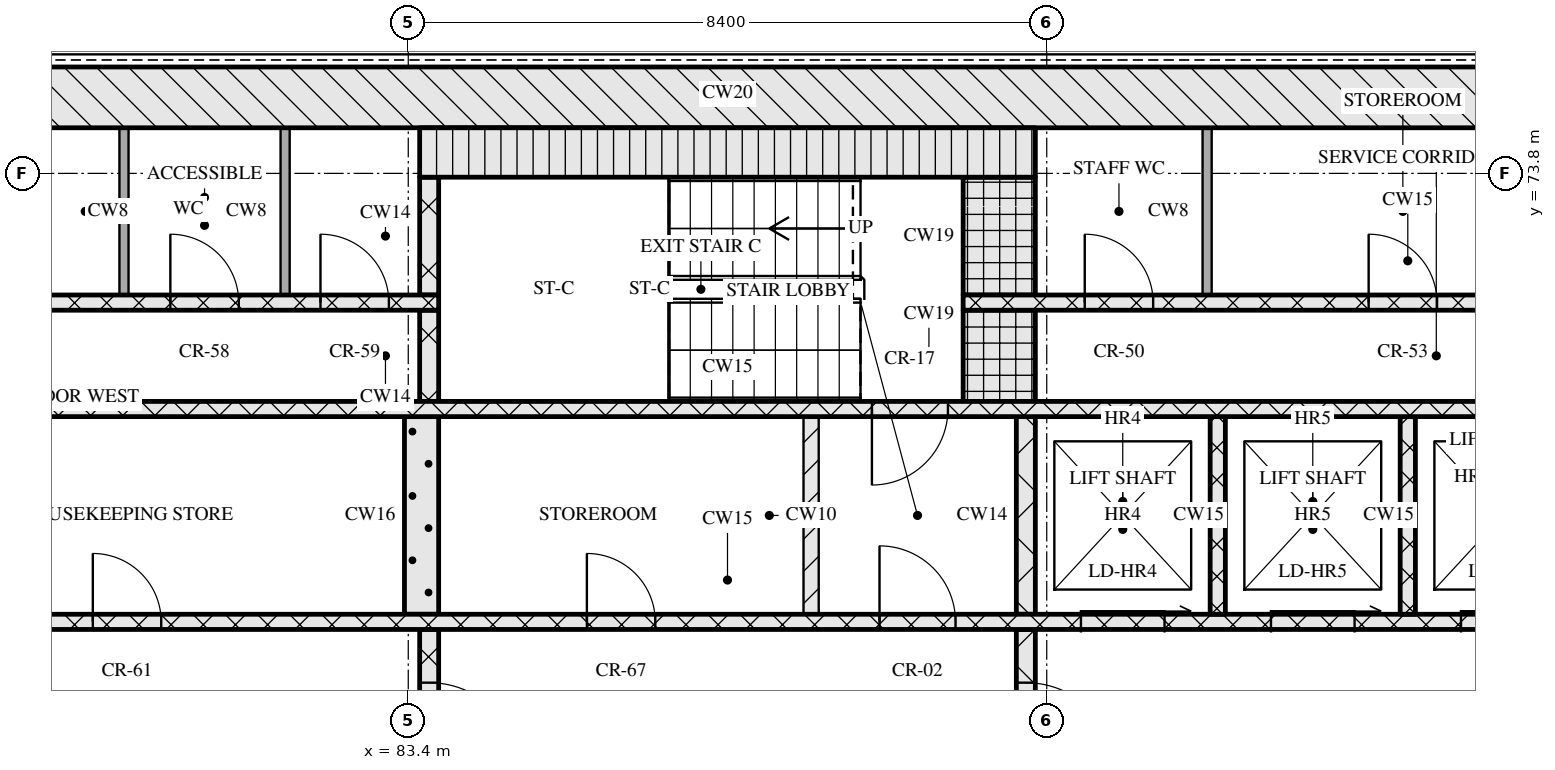
"""IFC4 building model, lengths in metres.
Left out: names, types, materials, properties, quantities, classifications, styles, units other than length and angle.
Written with IfcOpenShell. Run it as: python <this file> out.ifc"""

import sys

from ifc_helpers import new_model, si_unit, direction, frame, frame_2d, origin, place, context, subcontext, project, spatial, rectangle, extrude, element, fill, save


model = new_model("IFC4")
c1 = context("Model", 3, precision=1e-05, world=origin(), true_north=direction((0.0, 1.0)))
c2 = subcontext(c1, "Body", "Model", "MODEL_VIEW")
j1 = project(units=[si_unit("LENGTHUNIT", "METRE"), si_unit("PLANEANGLEUNIT", "RADIAN")], contexts=[c1])
p1 = place(None, origin())
s1 = spatial("IfcSite", under=j1, at=p1, CompositionType="ELEMENT")
p2 = place(p1, origin())
s2 = spatial("IfcBuilding", under=s1, at=p2, CompositionType="ELEMENT")
p3 = place(p2, frame((0.0, 0.0, 158.25)))
s3 = spatial("IfcBuildingStorey", under=s2, at=p3, CompositionType="ELEMENT", Elevation=158.25)
p4 = place(p3, frame((67.0, 74.8, 0.0), z_axis=(0.0, 0.0, 1.0), x_axis=(1.0, 0.0, 0.0)))
e1 = element("IfcWall", 1, at=p4, inside=s3, PredefinedType="SOLIDWALL", context=c2, shape_type="SweptSolid", body=[
    extrude(rectangle(XDim=41.2, YDim=0.8, at=frame_2d((20.6, 0.0))), origin(), (0.0, 0.0, 1.0), 3.32),
])
p5 = place(p3, frame((83.675, 65.2, 0.0), z_axis=(0.0, 0.0, 1.0), x_axis=(0.0, 1.0, 0.0)))
e2 = element("IfcWall", 2, at=p5, inside=s3, PredefinedType="SOLIDWALL", context=c2, shape_type="SweptSolid", body=[
    extrude(rectangle(XDim=2.6, YDim=0.25, at=frame_2d((1.3, 0.0))), origin(), (0.0, 0.0, 1.0), 3.32),
])
p6 = place(p5, frame((0.7, 0.0, 0.0)))
e3 = element("IfcOpeningElement", 3, at=p6, cuts=e2, PredefinedType="OPENING", context=c2, shape_type="SweptSolid", body=[
    extrude(rectangle(XDim=1.2, YDim=2.1, at=frame_2d((0.6, 1.05))), frame((0.0, 0.135, 0.0), z_axis=(0.0, -1.0, 0.0), x_axis=(1.0, 0.0, 0.0)), (0.0, 0.0, 1.0), 0.27),
])
p7 = place(p3, frame((91.525, 65.2, 0.0), z_axis=(0.0, 0.0, 1.0), x_axis=(0.0, 1.0, 0.0)))
e4 = element("IfcWall", 4, at=p7, inside=s3, PredefinedType="SOLIDWALL", context=c2, shape_type="SweptSolid", body=[
    extrude(rectangle(XDim=2.6, YDim=0.25, at=frame_2d((1.3, 0.0))), origin(), (0.0, 0.0, 1.0), 3.32),
])
p8 = place(p7, frame((0.7, 0.0, 0.0)))
e5 = element("IfcOpeningElement", 5, at=p8, cuts=e4, PredefinedType="OPENING", context=c2, shape_type="SweptSolid", body=[
    extrude(rectangle(XDim=1.2, YDim=2.1, at=frame_2d((0.6, 1.05))), frame((0.0, 0.135, 0.0), z_axis=(0.0, -1.0, 0.0), x_axis=(1.0, 0.0, 0.0)), (0.0, 0.0, 1.0), 0.27),
])
p9 = place(p3, frame((76.05, 67.9, 0.0), z_axis=(0.0, 0.0, 1.0), x_axis=(1.0, 0.0, 0.0)))
e6 = element("IfcWall", 6, at=p9, inside=s3, PredefinedType="SOLIDWALL", context=c2, shape_type="SweptSolid", body=[
    extrude(rectangle(XDim=23.1, YDim=0.2, at=frame_2d((11.55, 0.0))), origin(), (0.0, 0.0, 1.0), 3.32),
])
p10 = place(p9, frame((3.2, 0.0, 0.0)))
e7 = element("IfcOpeningElement", 7, at=p10, cuts=e6, PredefinedType="OPENING", context=c2, shape_type="SweptSolid", body=[
    extrude(rectangle(XDim=0.9, YDim=2.1, at=frame_2d((0.45, 1.05))), frame((0.0, 0.11, 0.0), z_axis=(0.0, -1.0, 0.0), x_axis=(1.0, 0.0, 0.0)), (0.0, 0.0, 1.0), 0.22),
])
p11 = place(p9, frame((9.7, 0.0, 0.0)))
e8 = element("IfcOpeningElement", 8, at=p11, cuts=e6, PredefinedType="OPENING", context=c2, shape_type="SweptSolid", body=[
    extrude(rectangle(XDim=0.9, YDim=2.1, at=frame_2d((0.45, 1.05))), frame((0.0, 0.11, 0.0), z_axis=(0.0, -1.0, 0.0), x_axis=(1.0, 0.0, 0.0)), (0.0, 0.0, 1.0), 0.22),
])
p12 = place(p9, frame((13.55, 0.0, 0.0)))
e9 = element("IfcOpeningElement", 9, at=p12, cuts=e6, PredefinedType="OPENING", context=c2, shape_type="SweptSolid", body=[
    extrude(rectangle(XDim=1.0, YDim=2.1, at=frame_2d((0.5, 1.05))), frame((0.0, 0.11, 0.0), z_axis=(0.0, -1.0, 0.0), x_axis=(1.0, 0.0, 0.0)), (0.0, 0.0, 1.0), 0.22),
])
p13 = place(p9, frame((16.2, 0.0, 0.0)))
e10 = element("IfcOpeningElement", 10, at=p13, cuts=e6, PredefinedType="OPENING", context=c2, shape_type="SweptSolid", body=[
    extrude(rectangle(XDim=1.1, YDim=2.1, at=frame_2d((0.55, 1.05))), frame((0.0, 0.11, 0.0), z_axis=(0.0, -1.0, 0.0), x_axis=(1.0, 0.0, 0.0)), (0.0, 0.0, 1.0), 0.22),
])
p14 = place(p9, frame((18.7, 0.0, 0.0)))
e11 = element("IfcOpeningElement", 11, at=p14, cuts=e6, PredefinedType="OPENING", context=c2, shape_type="SweptSolid", body=[
    extrude(rectangle(XDim=1.1, YDim=2.1, at=frame_2d((0.55, 1.05))), frame((0.0, 0.11, 0.0), z_axis=(0.0, -1.0, 0.0), x_axis=(1.0, 0.0, 0.0)), (0.0, 0.0, 1.0), 0.22),
])
p15 = place(p9, frame((21.2, 0.0, 0.0)))
e12 = element("IfcOpeningElement", 12, at=p15, cuts=e6, PredefinedType="OPENING", context=c2, shape_type="SweptSolid", body=[
    extrude(rectangle(XDim=1.1, YDim=2.1, at=frame_2d((0.55, 1.05))), frame((0.0, 0.11, 0.0), z_axis=(0.0, -1.0, 0.0), x_axis=(1.0, 0.0, 0.0)), (0.0, 0.0, 1.0), 0.22),
])
p16 = place(p3, frame((83.575, 68.0, 0.0), z_axis=(0.0, 0.0, 1.0), x_axis=(0.0, 1.0, 0.0)))
e13 = element("IfcWall", 13, at=p16, inside=s3, PredefinedType="SOLIDWALL", context=c2, shape_type="SweptSolid", body=[
    extrude(rectangle(XDim=2.6, YDim=0.45, at=frame_2d((1.3, 0.0))), origin(), (0.0, 0.0, 1.0), 3.32),
])
p17 = place(p3, frame((88.7, 68.0, 0.0), z_axis=(0.0, 0.0, 1.0), x_axis=(0.0, 1.0, 0.0)))
e14 = element("IfcWall", 14, at=p17, inside=s3, PredefinedType="PARTITIONING", context=c2, shape_type="SweptSolid", body=[
    extrude(rectangle(XDim=2.6, YDim=0.2, at=frame_2d((1.3, 0.0))), origin(), (0.0, 0.0, 1.0), 3.32),
])
p18 = place(p3, frame((91.525, 68.0, 0.0), z_axis=(0.0, 0.0, 1.0), x_axis=(0.0, 1.0, 0.0)))
e15 = element("IfcWall", 15, at=p18, inside=s3, PredefinedType="SOLIDWALL", context=c2, shape_type="SweptSolid", body=[
    extrude(rectangle(XDim=2.6, YDim=0.25, at=frame_2d((1.3, 0.0))), origin(), (0.0, 0.0, 1.0), 3.32),
])
for number, where, z_axis, x_axis in (
    (16, (94.05, 68.0, 0.0), (0.0, 0.0, 1.0), (0.0, 1.0, 0.0)),
    (17, (96.55, 68.0, 0.0), (0.0, 0.0, 1.0), (0.0, 1.0, 0.0)),
):
    element("IfcWall", number, at=place(p3, frame(where, z_axis=z_axis, x_axis=x_axis)), inside=s3, PredefinedType="SOLIDWALL", context=c2, shape_type="SweptSolid", body=[
        extrude(rectangle(XDim=2.6, YDim=0.2, at=frame_2d((1.3, 0.0))), origin(), (0.0, 0.0, 1.0), 3.32),
    ])
p19 = place(p3, frame((67.8, 70.7, 0.0), z_axis=(0.0, 0.0, 1.0), x_axis=(1.0, 0.0, 0.0)))
e18 = element("IfcWall", 18, at=p19, inside=s3, PredefinedType="SOLIDWALL", context=c2, shape_type="SweptSolid", body=[
    extrude(rectangle(XDim=39.6, YDim=0.2, at=frame_2d((19.8, 0.0))), origin(), (0.0, 0.0, 1.0), 3.32),
])
p20 = place(p19, frame((0.65, 0.0, 0.0)))
e19 = element("IfcOpeningElement", 19, at=p20, cuts=e18, PredefinedType="OPENING", context=c2, shape_type="SweptSolid", body=[
    extrude(rectangle(XDim=1.1, YDim=2.1, at=frame_2d((0.55, 1.05))), frame((0.0, 0.11, 0.0), z_axis=(0.0, -1.0, 0.0), x_axis=(1.0, 0.0, 0.0)), (0.0, 0.0, 1.0), 0.22),
])
p21 = place(p19, frame((3.25, 0.0, 0.0)))
e20 = element("IfcOpeningElement", 20, at=p21, cuts=e18, PredefinedType="OPENING", context=c2, shape_type="SweptSolid", body=[
    extrude(rectangle(XDim=1.1, YDim=2.1, at=frame_2d((0.55, 1.05))), frame((0.0, 0.11, 0.0), z_axis=(0.0, -1.0, 0.0), x_axis=(1.0, 0.0, 0.0)), (0.0, 0.0, 1.0), 0.22),
])
p22 = place(p19, frame((5.9, 0.0, 0.0)))
e21 = element("IfcOpeningElement", 21, at=p22, cuts=e18, PredefinedType="OPENING", context=c2, shape_type="SweptSolid", body=[
    extrude(rectangle(XDim=1.0, YDim=2.1, at=frame_2d((0.5, 1.05))), frame((0.0, 0.11, 0.0), z_axis=(0.0, -1.0, 0.0), x_axis=(1.0, 0.0, 0.0)), (0.0, 0.0, 1.0), 0.22),
])
p23 = place(p19, frame((21.7, 0.0, 0.0)))
e22 = element("IfcOpeningElement", 22, at=p23, cuts=e18, PredefinedType="OPENING", context=c2, shape_type="SweptSolid", body=[
    extrude(rectangle(XDim=1.0, YDim=2.1, at=frame_2d((0.5, 1.05))), frame((0.0, 0.11, 0.0), z_axis=(0.0, -1.0, 0.0), x_axis=(1.0, 0.0, 0.0)), (0.0, 0.0, 1.0), 0.22),
])
p24 = place(p19, frame((32.7, 0.0, 0.0)))
e23 = element("IfcOpeningElement", 23, at=p24, cuts=e18, PredefinedType="OPENING", context=c2, shape_type="SweptSolid", body=[
    extrude(rectangle(XDim=1.0, YDim=2.1, at=frame_2d((0.5, 1.05))), frame((0.0, 0.11, 0.0), z_axis=(0.0, -1.0, 0.0), x_axis=(1.0, 0.0, 0.0)), (0.0, 0.0, 1.0), 0.22),
])
p25 = place(p19, frame((35.25, 0.0, 0.0)))
e24 = element("IfcOpeningElement", 24, at=p25, cuts=e18, PredefinedType="OPENING", context=c2, shape_type="SweptSolid", body=[
    extrude(rectangle(XDim=1.1, YDim=2.1, at=frame_2d((0.55, 1.05))), frame((0.0, 0.11, 0.0), z_axis=(0.0, -1.0, 0.0), x_axis=(1.0, 0.0, 0.0)), (0.0, 0.0, 1.0), 0.22),
])
p26 = place(p19, frame((37.85, 0.0, 0.0)))
e25 = element("IfcOpeningElement", 25, at=p26, cuts=e18, PredefinedType="OPENING", context=c2, shape_type="SweptSolid", body=[
    extrude(rectangle(XDim=1.1, YDim=2.1, at=frame_2d((0.55, 1.05))), frame((0.0, 0.11, 0.0), z_axis=(0.0, -1.0, 0.0), x_axis=(1.0, 0.0, 0.0)), (0.0, 0.0, 1.0), 0.22),
])
p27 = place(p3, frame((83.675, 70.8, 0.0), z_axis=(0.0, 0.0, 1.0), x_axis=(0.0, 1.0, 0.0)))
e26 = element("IfcWall", 26, at=p27, inside=s3, PredefinedType="SOLIDWALL", context=c2, shape_type="SweptSolid", body=[
    extrude(rectangle(XDim=1.2, YDim=0.25, at=frame_2d((0.6, 0.0))), origin(), (0.0, 0.0, 1.0), 3.32),
])
p28 = place(p3, frame((91.175, 70.8, 0.0), z_axis=(0.0, 0.0, 1.0), x_axis=(0.0, 1.0, 0.0)))
e27 = element("IfcWall", 27, at=p28, inside=s3, PredefinedType="SOLIDWALL", context=c2, shape_type="SweptSolid", body=[
    extrude(rectangle(XDim=1.2, YDim=0.95, at=frame_2d((0.6, 0.0))), origin(), (0.0, 0.0, 1.0), 3.32),
])
p29 = place(p3, frame((72.8, 72.1, 0.0), z_axis=(0.0, 0.0, 1.0), x_axis=(1.0, 0.0, 0.0)))
e28 = element("IfcWall", 28, at=p29, inside=s3, PredefinedType="SOLIDWALL", context=c2, shape_type="SweptSolid", body=[
    extrude(rectangle(XDim=11.0, YDim=0.2, at=frame_2d((5.5, 0.0))), origin(), (0.0, 0.0, 1.0), 3.32),
])
p30 = place(p29, frame((1.25, 0.0, 0.0)))
e29 = element("IfcOpeningElement", 29, at=p30, cuts=e28, PredefinedType="OPENING", context=c2, shape_type="SweptSolid", body=[
    extrude(rectangle(XDim=0.9, YDim=2.1, at=frame_2d((0.45, 1.05))), frame((0.0, 0.11, 0.0), z_axis=(0.0, -1.0, 0.0), x_axis=(1.0, 0.0, 0.0)), (0.0, 0.0, 1.0), 0.22),
])
p31 = place(p29, frame((4.65, 0.0, 0.0)))
e30 = element("IfcOpeningElement", 30, at=p31, cuts=e28, PredefinedType="OPENING", context=c2, shape_type="SweptSolid", body=[
    extrude(rectangle(XDim=0.9, YDim=2.1, at=frame_2d((0.45, 1.05))), frame((0.0, 0.11, 0.0), z_axis=(0.0, -1.0, 0.0), x_axis=(1.0, 0.0, 0.0)), (0.0, 0.0, 1.0), 0.22),
])
p32 = place(p29, frame((7.47, 0.0, 0.0)))
e31 = element("IfcOpeningElement", 31, at=p32, cuts=e28, PredefinedType="OPENING", context=c2, shape_type="SweptSolid", body=[
    extrude(rectangle(XDim=0.9, YDim=2.1, at=frame_2d((0.45, 1.05))), frame((0.0, 0.11, 0.0), z_axis=(0.0, -1.0, 0.0), x_axis=(1.0, 0.0, 0.0)), (0.0, 0.0, 1.0), 0.22),
])
p33 = place(p29, frame((9.445, 0.0, 0.0)))
e32 = element("IfcOpeningElement", 32, at=p33, cuts=e28, PredefinedType="OPENING", context=c2, shape_type="SweptSolid", body=[
    extrude(rectangle(XDim=0.9, YDim=2.1, at=frame_2d((0.45, 1.05))), frame((0.0, 0.11, 0.0), z_axis=(0.0, -1.0, 0.0), x_axis=(1.0, 0.0, 0.0)), (0.0, 0.0, 1.0), 0.22),
])
p34 = place(p3, frame((90.7, 72.1, 0.0), z_axis=(0.0, 0.0, 1.0), x_axis=(1.0, 0.0, 0.0)))
e33 = element("IfcWall", 33, at=p34, inside=s3, PredefinedType="SOLIDWALL", context=c2, shape_type="SweptSolid", body=[
    extrude(rectangle(XDim=11.7, YDim=0.2, at=frame_2d((5.85, 0.0))), origin(), (0.0, 0.0, 1.0), 3.32),
])
p35 = place(p34, frame((1.6, 0.0, 0.0)))
e34 = element("IfcOpeningElement", 34, at=p35, cuts=e33, PredefinedType="OPENING", context=c2, shape_type="SweptSolid", body=[
    extrude(rectangle(XDim=0.9, YDim=2.1, at=frame_2d((0.45, 1.05))), frame((0.0, 0.11, 0.0), z_axis=(0.0, -1.0, 0.0), x_axis=(1.0, 0.0, 0.0)), (0.0, 0.0, 1.0), 0.22),
])
p36 = place(p34, frame((5.335, 0.0, 0.0)))
e35 = element("IfcOpeningElement", 35, at=p36, cuts=e33, PredefinedType="OPENING", context=c2, shape_type="SweptSolid", body=[
    extrude(rectangle(XDim=0.9, YDim=2.1, at=frame_2d((0.45, 1.05))), frame((0.0, 0.11, 0.0), z_axis=(0.0, -1.0, 0.0), x_axis=(1.0, 0.0, 0.0)), (0.0, 0.0, 1.0), 0.22),
])
p37 = place(p34, frame((9.55, 0.0, 0.0)))
e36 = element("IfcOpeningElement", 36, at=p37, cuts=e33, PredefinedType="OPENING", context=c2, shape_type="SweptSolid", body=[
    extrude(rectangle(XDim=0.9, YDim=2.1, at=frame_2d((0.45, 1.05))), frame((0.0, 0.11, 0.0), z_axis=(0.0, -1.0, 0.0), x_axis=(1.0, 0.0, 0.0)), (0.0, 0.0, 1.0), 0.22),
])
for number, where, z_axis, x_axis in (
    (37, (79.66, 72.2, 0.0), (0.0, 0.0, 1.0), (0.0, 1.0, 0.0)),
    (38, (81.78, 72.2, 0.0), (0.0, 0.0, 1.0), (0.0, 1.0, 0.0)),
):
    element("IfcWall", number, at=place(p3, frame(where, z_axis=z_axis, x_axis=x_axis)), inside=s3, PredefinedType="PARTITIONING", context=c2, shape_type="SweptSolid", body=[
        extrude(rectangle(XDim=2.2, YDim=0.12, at=frame_2d((1.1, 0.0))), origin(), (0.0, 0.0, 1.0), 3.32),
    ])
p38 = place(p3, frame((83.675, 72.2, 0.0), z_axis=(0.0, 0.0, 1.0), x_axis=(0.0, 1.0, 0.0)))
e39 = element("IfcWall", 39, at=p38, inside=s3, PredefinedType="SOLIDWALL", context=c2, shape_type="SweptSolid", body=[
    extrude(rectangle(XDim=1.55, YDim=0.25, at=frame_2d((0.775, 0.0))), origin(), (0.0, 0.0, 1.0), 3.32),
])
p39 = place(p3, frame((91.175, 72.2, 0.0), z_axis=(0.0, 0.0, 1.0), x_axis=(0.0, 1.0, 0.0)))
e40 = element("IfcWall", 40, at=p39, inside=s3, PredefinedType="SOLIDWALL", context=c2, shape_type="SweptSolid", body=[
    extrude(rectangle(XDim=1.55, YDim=0.95, at=frame_2d((0.775, 0.0))), origin(), (0.0, 0.0, 1.0), 3.32),
])
p40 = place(p3, frame((93.91, 72.2, 0.0), z_axis=(0.0, 0.0, 1.0), x_axis=(0.0, 1.0, 0.0)))
e41 = element("IfcWall", 41, at=p40, inside=s3, PredefinedType="PARTITIONING", context=c2, shape_type="SweptSolid", body=[
    extrude(rectangle(XDim=2.2, YDim=0.12, at=frame_2d((1.1, 0.0))), origin(), (0.0, 0.0, 1.0), 3.32),
])
p41 = place(p3, frame((83.55, 74.075, 0.0), z_axis=(0.0, 0.0, 1.0), x_axis=(1.0, 0.0, 0.0)))
e42 = element("IfcWall", 42, at=p41, inside=s3, PredefinedType="SOLIDWALL", context=c2, shape_type="SweptSolid", body=[
    extrude(rectangle(XDim=8.1, YDim=0.65, at=frame_2d((4.05, 0.0))), origin(), (0.0, 0.0, 1.0), 3.32),
])
p42 = place(p6, origin())
e43 = element("IfcDoor", 43, at=p42, inside=s3, OperationType="SINGLE_SWING_RIGHT", PredefinedType="DOOR", context=c2, shape_type="SweptSolid", body=[
    extrude(rectangle(XDim=1.2, YDim=2.1, at=frame_2d((0.6, 1.05))), frame((0.0, 0.025, 0.0), z_axis=(0.0, -1.0, 0.0), x_axis=(1.0, 0.0, 0.0)), (0.0, 0.0, 1.0), 0.05),
])
fill(e3, e43)
p43 = place(p8, origin())
e44 = element("IfcDoor", 44, at=p43, inside=s3, OperationType="SINGLE_SWING_RIGHT", PredefinedType="DOOR", context=c2, shape_type="SweptSolid", body=[
    extrude(rectangle(XDim=1.2, YDim=2.1, at=frame_2d((0.6, 1.05))), frame((0.0, 0.025, 0.0), z_axis=(0.0, -1.0, 0.0), x_axis=(1.0, 0.0, 0.0)), (0.0, 0.0, 1.0), 0.05),
])
fill(e5, e44)
p44 = place(p10, origin())
e45 = element("IfcDoor", 45, at=p44, inside=s3, OperationType="SINGLE_SWING_LEFT", PredefinedType="DOOR", context=c2, shape_type="SweptSolid", body=[
    extrude(rectangle(XDim=0.9, YDim=2.1, at=frame_2d((0.45, 1.05))), frame((0.0, 0.025, 0.0), z_axis=(0.0, -1.0, 0.0), x_axis=(1.0, 0.0, 0.0)), (0.0, 0.0, 1.0), 0.05),
])
fill(e7, e45)
p45 = place(p11, origin())
e46 = element("IfcDoor", 46, at=p45, inside=s3, OperationType="SINGLE_SWING_LEFT", PredefinedType="DOOR", context=c2, shape_type="SweptSolid", body=[
    extrude(rectangle(XDim=0.9, YDim=2.1, at=frame_2d((0.45, 1.05))), frame((0.0, 0.025, 0.0), z_axis=(0.0, -1.0, 0.0), x_axis=(1.0, 0.0, 0.0)), (0.0, 0.0, 1.0), 0.05),
])
fill(e8, e46)
p46 = place(p12, origin())
e47 = element("IfcDoor", 47, at=p46, inside=s3, OperationType="SINGLE_SWING_LEFT", PredefinedType="DOOR", context=c2, shape_type="SweptSolid", body=[
    extrude(rectangle(XDim=1.0, YDim=2.1, at=frame_2d((0.5, 1.05))), frame((0.0, 0.025, 0.0), z_axis=(0.0, -1.0, 0.0), x_axis=(1.0, 0.0, 0.0)), (0.0, 0.0, 1.0), 0.05),
])
fill(e9, e47)
p47 = place(p13, origin())
e48 = element("IfcDoor", 48, at=p47, inside=s3, OperationType="SLIDING_TO_RIGHT", PredefinedType="DOOR", context=c2, shape_type="SweptSolid", body=[
    extrude(rectangle(XDim=1.1, YDim=2.1, at=frame_2d((0.55, 1.05))), frame((0.0, 0.025, 0.0), z_axis=(0.0, -1.0, 0.0), x_axis=(1.0, 0.0, 0.0)), (0.0, 0.0, 1.0), 0.05),
])
fill(e10, e48)
p48 = place(p14, origin())
e49 = element("IfcDoor", 49, at=p48, inside=s3, OperationType="SLIDING_TO_RIGHT", PredefinedType="DOOR", context=c2, shape_type="SweptSolid", body=[
    extrude(rectangle(XDim=1.1, YDim=2.1, at=frame_2d((0.55, 1.05))), frame((0.0, 0.025, 0.0), z_axis=(0.0, -1.0, 0.0), x_axis=(1.0, 0.0, 0.0)), (0.0, 0.0, 1.0), 0.05),
])
fill(e11, e49)
p49 = place(p15, origin())
e50 = element("IfcDoor", 50, at=p49, inside=s3, OperationType="SLIDING_TO_RIGHT", PredefinedType="DOOR", context=c2, shape_type="SweptSolid", body=[
    extrude(rectangle(XDim=1.1, YDim=2.1, at=frame_2d((0.55, 1.05))), frame((0.0, 0.025, 0.0), z_axis=(0.0, -1.0, 0.0), x_axis=(1.0, 0.0, 0.0)), (0.0, 0.0, 1.0), 0.05),
])
fill(e12, e50)
p50 = place(p23, origin())
e51 = element("IfcDoor", 51, at=p50, inside=s3, OperationType="SINGLE_SWING_RIGHT", PredefinedType="DOOR", context=c2, shape_type="SweptSolid", body=[
    extrude(rectangle(XDim=1.0, YDim=2.1, at=frame_2d((0.5, 1.05))), frame((0.0, 0.025, 0.0), z_axis=(0.0, -1.0, 0.0), x_axis=(1.0, 0.0, 0.0)), (0.0, 0.0, 1.0), 0.05),
])
fill(e22, e51)
p51 = place(p32, origin())
e52 = element("IfcDoor", 52, at=p51, inside=s3, OperationType="SINGLE_SWING_LEFT", PredefinedType="DOOR", context=c2, shape_type="SweptSolid", body=[
    extrude(rectangle(XDim=0.9, YDim=2.1, at=frame_2d((0.45, 1.05))), frame((0.0, 0.025, 0.0), z_axis=(0.0, -1.0, 0.0), x_axis=(1.0, 0.0, 0.0)), (0.0, 0.0, 1.0), 0.05),
])
fill(e31, e52)
p52 = place(p33, origin())
e53 = element("IfcDoor", 53, at=p52, inside=s3, OperationType="SINGLE_SWING_LEFT", PredefinedType="DOOR", context=c2, shape_type="SweptSolid", body=[
    extrude(rectangle(XDim=0.9, YDim=2.1, at=frame_2d((0.45, 1.05))), frame((0.0, 0.025, 0.0), z_axis=(0.0, -1.0, 0.0), x_axis=(1.0, 0.0, 0.0)), (0.0, 0.0, 1.0), 0.05),
])
fill(e32, e53)
p53 = place(p35, origin())
e54 = element("IfcDoor", 54, at=p53, inside=s3, OperationType="SINGLE_SWING_LEFT", PredefinedType="DOOR", context=c2, shape_type="SweptSolid", body=[
    extrude(rectangle(XDim=0.9, YDim=2.1, at=frame_2d((0.45, 1.05))), frame((0.0, 0.025, 0.0), z_axis=(0.0, -1.0, 0.0), x_axis=(1.0, 0.0, 0.0)), (0.0, 0.0, 1.0), 0.05),
])
fill(e34, e54)
p54 = place(p36, origin())
e55 = element("IfcDoor", 55, at=p54, inside=s3, OperationType="SINGLE_SWING_LEFT", PredefinedType="DOOR", context=c2, shape_type="SweptSolid", body=[
    extrude(rectangle(XDim=0.9, YDim=2.1, at=frame_2d((0.45, 1.05))), frame((0.0, 0.025, 0.0), z_axis=(0.0, -1.0, 0.0), x_axis=(1.0, 0.0, 0.0)), (0.0, 0.0, 1.0), 0.05),
])
fill(e35, e55)
save(model, sys.argv[1])
